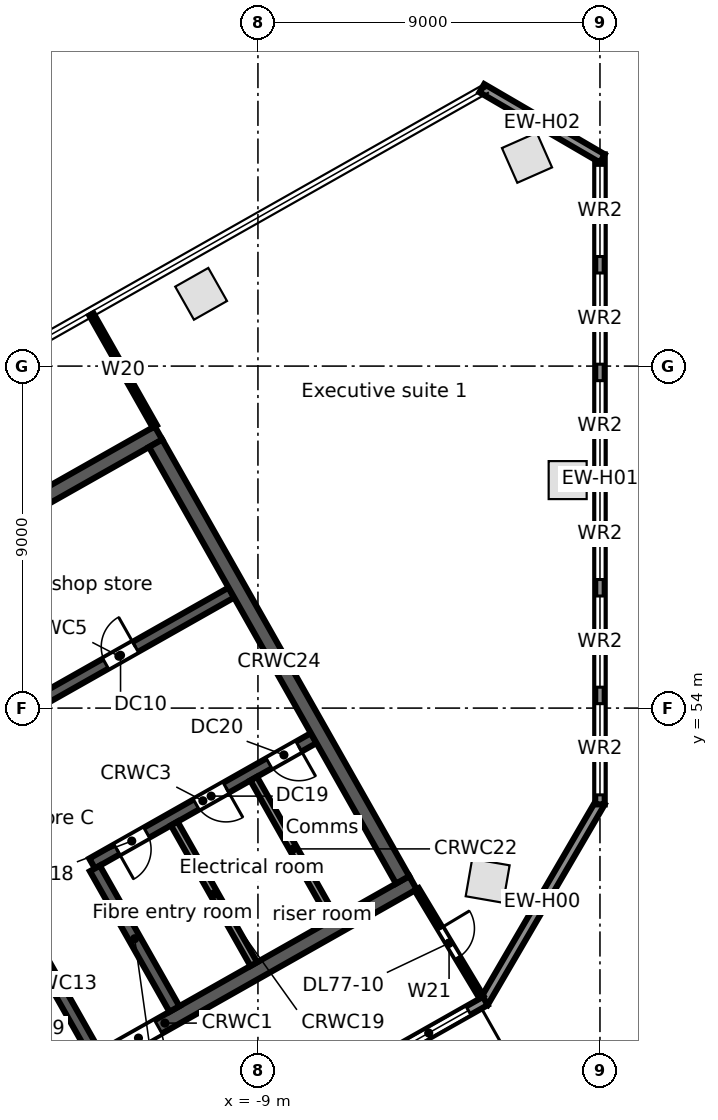
"""IFC4 building model, lengths in metres.
Left out: names, types, materials, properties, quantities, classifications, styles, units other than length and angle.
Written with IfcOpenShell. Run it as: python <this file> out.ifc"""

import sys

from ifc_helpers import new_model, si_unit, direction, frame, frame_2d, origin, origin_2d, place, context, subcontext, project, spatial, rectangle, extrude, element, fill, save


model = new_model("IFC4")
c1 = context("Model", 3, precision=1e-05, world=origin(), true_north=direction((0.0, 1.0)))
c2 = subcontext(c1, "Body", "Model", "MODEL_VIEW")
j1 = project(units=[si_unit("LENGTHUNIT", "METRE"), si_unit("PLANEANGLEUNIT", "RADIAN")], contexts=[c1])
p1 = place(None, origin())
s1 = spatial("IfcSite", under=j1, at=p1, CompositionType="ELEMENT")
p2 = place(p1, origin())
s2 = spatial("IfcBuilding", under=s1, at=p2, CompositionType="ELEMENT")
p3 = place(p2, frame((0.0, 0.0, 343.1)))
s3 = spatial("IfcBuildingStorey", under=s2, at=p3, CompositionType="ELEMENT", Elevation=343.1)
for number, where, z_axis, x_axis in (
    (1, (-10.495, 64.902, 0.0), (0.0, 0.0, 1.0), (-0.87, -0.492, 0.0)),
    (2, (-2.955, 49.456, 0.0), (0.0, 0.0, 1.0), (-0.985, 0.171, 0.0)),
    (3, (-0.85, 60.0, 0.0), (0.0, 0.0, 1.0), (0.0, 1.0, 0.0)),
    (4, (-1.92, 68.483, 0.0), (0.0, 0.0, 1.0), (-0.915, -0.404, 0.0)),
):
    element("IfcColumn", number, at=place(p3, frame(where, z_axis=z_axis, x_axis=x_axis)), inside=s3, PredefinedType="COLUMN", context=c2, shape_type="SweptSolid", body=[
        extrude(rectangle(XDim=1.0, YDim=1.0, at=origin_2d()), origin(), (0.0, 0.0, 1.0), 3.5),
    ])
p4 = place(p3, frame((0.017, 51.529, 0.0), z_axis=(0.0, 0.0, 1.0), x_axis=(-0.503769237131, -0.863838269424, 0.0)))
e5 = element("IfcWall", 5, at=p4, inside=s3, PredefinedType="STANDARD", context=c2, shape_type="SweptSolid", body=[
    extrude(rectangle(XDim=6.115, YDim=0.25, at=frame_2d((3.057, 0.0))), origin(), (0.0, 0.0, 1.0), 3.5),
])
p5 = place(p3, frame((0.0, 68.572, 0.0), z_axis=(0.0, 0.0, 1.0), x_axis=(0.0, -1.0, 0.0)))
e6 = element("IfcWall", 6, at=p5, inside=s3, PredefinedType="STANDARD", context=c2, shape_type="SweptSolid", body=[
    extrude(rectangle(XDim=17.105, YDim=0.25, at=frame_2d((8.553, 0.0))), origin(), (0.0, 0.0, 1.0), 3.5),
])
p6 = place(p5, frame((14.455, 0.0, 0.8)))
e7 = element("IfcOpeningElement", 7, at=p6, cuts=e6, PredefinedType="OPENING", context=c2, shape_type="SweptSolid", body=[
    extrude(rectangle(XDim=2.4, YDim=2.2, at=frame_2d((1.2, 1.1))), frame((0.0, 0.135, 0.0), z_axis=(0.0, -1.0, 0.0), x_axis=(1.0, 0.0, 0.0)), (0.0, 0.0, 1.0), 0.27),
])
p7 = place(p5, frame((11.622, 0.0, 0.8)))
e8 = element("IfcOpeningElement", 8, at=p7, cuts=e6, PredefinedType="OPENING", context=c2, shape_type="SweptSolid", body=[
    extrude(rectangle(XDim=2.4, YDim=2.2, at=frame_2d((1.2, 1.1))), frame((0.0, 0.135, 0.0), z_axis=(0.0, -1.0, 0.0), x_axis=(1.0, 0.0, 0.0)), (0.0, 0.0, 1.0), 0.27),
])
p8 = place(p5, frame((8.789, 0.0, 0.8)))
e9 = element("IfcOpeningElement", 9, at=p8, cuts=e6, PredefinedType="OPENING", context=c2, shape_type="SweptSolid", body=[
    extrude(rectangle(XDim=2.4, YDim=2.2, at=frame_2d((1.2, 1.1))), frame((0.0, 0.135, 0.0), z_axis=(0.0, -1.0, 0.0), x_axis=(1.0, 0.0, 0.0)), (0.0, 0.0, 1.0), 0.27),
])
p9 = place(p5, frame((5.955, 0.0, 0.8)))
e10 = element("IfcOpeningElement", 10, at=p9, cuts=e6, PredefinedType="OPENING", context=c2, shape_type="SweptSolid", body=[
    extrude(rectangle(XDim=2.4, YDim=2.2, at=frame_2d((1.2, 1.1))), frame((0.0, 0.135, 0.0), z_axis=(0.0, -1.0, 0.0), x_axis=(1.0, 0.0, 0.0)), (0.0, 0.0, 1.0), 0.27),
])
p10 = place(p5, frame((3.122, 0.0, 0.8)))
e11 = element("IfcOpeningElement", 11, at=p10, cuts=e6, PredefinedType="OPENING", context=c2, shape_type="SweptSolid", body=[
    extrude(rectangle(XDim=2.4, YDim=2.2, at=frame_2d((1.2, 1.1))), frame((0.0, 0.135, 0.0), z_axis=(0.0, -1.0, 0.0), x_axis=(1.0, 0.0, 0.0)), (0.0, 0.0, 1.0), 0.27),
])
p11 = place(p5, frame((0.289, 0.0, 0.8)))
e12 = element("IfcOpeningElement", 12, at=p11, cuts=e6, PredefinedType="OPENING", context=c2, shape_type="SweptSolid", body=[
    extrude(rectangle(XDim=2.4, YDim=2.2, at=frame_2d((1.2, 1.1))), frame((0.0, 0.135, 0.0), z_axis=(0.0, -1.0, 0.0), x_axis=(1.0, 0.0, 0.0)), (0.0, 0.0, 1.0), 0.27),
])
p12 = place(p3, frame((-3.108, 70.313, 0.0), z_axis=(0.0, 0.0, 1.0), x_axis=(0.86382474085, -0.503792434536, 0.0)))
e13 = element("IfcWall", 13, at=p12, inside=s3, PredefinedType="STANDARD", context=c2, shape_type="SweptSolid", body=[
    extrude(rectangle(XDim=3.67, YDim=0.25, at=frame_2d((1.835, 0.0))), origin(), (0.0, 0.0, 1.0), 3.5),
])
p13 = place(p3, frame((-3.017, 46.293, 0.0), z_axis=(0.0, 0.0, 1.0), x_axis=(-0.870355474887, -0.492423950812, 0.0)))
e14 = element("IfcWall", 14, at=p13, inside=s3, PredefinedType="STANDARD", context=c2, shape_type="SweptSolid", body=[
    extrude(rectangle(XDim=40.34, YDim=0.25, at=frame_2d((20.17, 0.0))), origin(), (0.0, 0.0, 1.0), 3.5),
])
p14 = place(p13, frame((37.428, 0.0, 0.8)))
e15 = element("IfcOpeningElement", 15, at=p14, cuts=e14, PredefinedType="OPENING", context=c2, shape_type="SweptSolid", body=[
    extrude(rectangle(XDim=2.4, YDim=2.2, at=frame_2d((1.2, 1.1))), frame((0.0, 0.135, 0.0), z_axis=(0.0, -1.0, 0.0), x_axis=(1.0, 0.0, 0.0)), (0.0, 0.0, 1.0), 0.27),
])
p15 = place(p13, frame((34.372, 0.0, 0.0)))
e16 = element("IfcOpeningElement", 16, at=p15, cuts=e14, PredefinedType="OPENING", context=c2, shape_type="SweptSolid", body=[
    extrude(rectangle(XDim=1.8, YDim=2.4, at=frame_2d((0.9, 1.2))), frame((0.0, 0.135, 0.0), z_axis=(0.0, -1.0, 0.0), x_axis=(1.0, 0.0, 0.0)), (0.0, 0.0, 1.0), 0.27),
])
p16 = place(p13, frame((30.716, 0.0, 0.8)))
e17 = element("IfcOpeningElement", 17, at=p16, cuts=e14, PredefinedType="OPENING", context=c2, shape_type="SweptSolid", body=[
    extrude(rectangle(XDim=2.4, YDim=2.2, at=frame_2d((1.2, 1.1))), frame((0.0, 0.135, 0.0), z_axis=(0.0, -1.0, 0.0), x_axis=(1.0, 0.0, 0.0)), (0.0, 0.0, 1.0), 0.27),
])
p17 = place(p13, frame((27.36, 0.0, 0.8)))
e18 = element("IfcOpeningElement", 18, at=p17, cuts=e14, PredefinedType="OPENING", context=c2, shape_type="SweptSolid", body=[
    extrude(rectangle(XDim=2.4, YDim=2.2, at=frame_2d((1.2, 1.1))), frame((0.0, 0.135, 0.0), z_axis=(0.0, -1.0, 0.0), x_axis=(1.0, 0.0, 0.0)), (0.0, 0.0, 1.0), 0.27),
])
p18 = place(p13, frame((24.304, 0.0, 0.0)))
e19 = element("IfcOpeningElement", 19, at=p18, cuts=e14, PredefinedType="OPENING", context=c2, shape_type="SweptSolid", body=[
    extrude(rectangle(XDim=1.8, YDim=2.4, at=frame_2d((0.9, 1.2))), frame((0.0, 0.135, 0.0), z_axis=(0.0, -1.0, 0.0), x_axis=(1.0, 0.0, 0.0)), (0.0, 0.0, 1.0), 0.27),
])
p19 = place(p13, frame((20.648, 0.0, 0.8)))
e20 = element("IfcOpeningElement", 20, at=p19, cuts=e14, PredefinedType="OPENING", context=c2, shape_type="SweptSolid", body=[
    extrude(rectangle(XDim=2.4, YDim=2.2, at=frame_2d((1.2, 1.1))), frame((0.0, 0.135, 0.0), z_axis=(0.0, -1.0, 0.0), x_axis=(1.0, 0.0, 0.0)), (0.0, 0.0, 1.0), 0.27),
])
p20 = place(p13, frame((17.292, 0.0, 0.8)))
e21 = element("IfcOpeningElement", 21, at=p20, cuts=e14, PredefinedType="OPENING", context=c2, shape_type="SweptSolid", body=[
    extrude(rectangle(XDim=2.4, YDim=2.2, at=frame_2d((1.2, 1.1))), frame((0.0, 0.135, 0.0), z_axis=(0.0, -1.0, 0.0), x_axis=(1.0, 0.0, 0.0)), (0.0, 0.0, 1.0), 0.27),
])
p21 = place(p13, frame((14.236, 0.0, 0.0)))
e22 = element("IfcOpeningElement", 22, at=p21, cuts=e14, PredefinedType="OPENING", context=c2, shape_type="SweptSolid", body=[
    extrude(rectangle(XDim=1.8, YDim=2.4, at=frame_2d((0.9, 1.2))), frame((0.0, 0.135, 0.0), z_axis=(0.0, -1.0, 0.0), x_axis=(1.0, 0.0, 0.0)), (0.0, 0.0, 1.0), 0.27),
])
p22 = place(p13, frame((10.58, 0.0, 0.8)))
e23 = element("IfcOpeningElement", 23, at=p22, cuts=e14, PredefinedType="OPENING", context=c2, shape_type="SweptSolid", body=[
    extrude(rectangle(XDim=2.4, YDim=2.2, at=frame_2d((1.2, 1.1))), frame((0.0, 0.135, 0.0), z_axis=(0.0, -1.0, 0.0), x_axis=(1.0, 0.0, 0.0)), (0.0, 0.0, 1.0), 0.27),
])
p23 = place(p13, frame((7.224, 0.0, 0.8)))
e24 = element("IfcOpeningElement", 24, at=p23, cuts=e14, PredefinedType="OPENING", context=c2, shape_type="SweptSolid", body=[
    extrude(rectangle(XDim=2.4, YDim=2.2, at=frame_2d((1.2, 1.1))), frame((0.0, 0.135, 0.0), z_axis=(0.0, -1.0, 0.0), x_axis=(1.0, 0.0, 0.0)), (0.0, 0.0, 1.0), 0.27),
])
p24 = place(p13, frame((4.168, 0.0, 0.0)))
e25 = element("IfcOpeningElement", 25, at=p24, cuts=e14, PredefinedType="OPENING", context=c2, shape_type="SweptSolid", body=[
    extrude(rectangle(XDim=1.8, YDim=2.4, at=frame_2d((0.9, 1.2))), frame((0.0, 0.135, 0.0), z_axis=(0.0, -1.0, 0.0), x_axis=(1.0, 0.0, 0.0)), (0.0, 0.0, 1.0), 0.27),
])
p25 = place(p13, frame((0.512, 0.0, 0.8)))
e26 = element("IfcOpeningElement", 26, at=p25, cuts=e14, PredefinedType="OPENING", context=c2, shape_type="SweptSolid", body=[
    extrude(rectangle(XDim=2.4, YDim=2.2, at=frame_2d((1.2, 1.1))), frame((0.0, 0.135, 0.0), z_axis=(0.0, -1.0, 0.0), x_axis=(1.0, 0.0, 0.0)), (0.0, 0.0, 1.0), 0.27),
])
p26 = place(p3, frame((-17.975, 42.017, 0.0), z_axis=(0.0, 0.0, 1.0), x_axis=(0.87034965173, 0.492434243055, 0.0)))
e27 = element("IfcWall", 27, at=p26, inside=s3, PredefinedType="SOLIDWALL", context=c2, shape_type="SweptSolid", body=[
    extrude(rectangle(XDim=15.0, YDim=0.4, at=frame_2d((7.5, 0.0))), origin(), (0.0, 0.0, 1.0), 3.5),
])
p27 = place(p26, frame((6.1, 0.0, 0.0)))
e28 = element("IfcOpeningElement", 28, at=p27, cuts=e27, PredefinedType="OPENING", context=c2, shape_type="SweptSolid", body=[
    extrude(rectangle(XDim=1.2, YDim=2.1, at=frame_2d((0.6, 1.05))), frame((0.0, 0.21, 0.0), z_axis=(0.0, -1.0, 0.0), x_axis=(1.0, 0.0, 0.0)), (0.0, 0.0, 1.0), 0.42),
])
p28 = place(p3, frame((-13.365, 49.911, 0.0), z_axis=(0.0, 0.0, 1.0), x_axis=(0.870347618718, 0.492437836272, 0.0)))
e29 = element("IfcWall", 29, at=p28, inside=s3, PredefinedType="SOLIDWALL", context=c2, shape_type="SweptSolid", body=[
    extrude(rectangle(XDim=6.7, YDim=0.3, at=frame_2d((3.35, 0.0))), origin(), (0.0, 0.0, 1.0), 3.5),
])
p29 = place(p28, frame((0.75, 0.0, 0.0)))
e30 = element("IfcOpeningElement", 30, at=p29, cuts=e29, PredefinedType="OPENING", context=c2, shape_type="SweptSolid", body=[
    extrude(rectangle(XDim=0.9, YDim=2.1, at=frame_2d((0.45, 1.05))), frame((0.0, 0.16, 0.0), z_axis=(0.0, -1.0, 0.0), x_axis=(1.0, 0.0, 0.0)), (0.0, 0.0, 1.0), 0.32),
])
p30 = place(p28, frame((3.15, 0.0, 0.0)))
e31 = element("IfcOpeningElement", 31, at=p30, cuts=e29, PredefinedType="OPENING", context=c2, shape_type="SweptSolid", body=[
    extrude(rectangle(XDim=0.9, YDim=2.1, at=frame_2d((0.45, 1.05))), frame((0.0, 0.16, 0.0), z_axis=(0.0, -1.0, 0.0), x_axis=(1.0, 0.0, 0.0)), (0.0, 0.0, 1.0), 0.32),
])
p31 = place(p28, frame((5.35, 0.0, 0.0)))
e32 = element("IfcOpeningElement", 32, at=p31, cuts=e29, PredefinedType="OPENING", context=c2, shape_type="SweptSolid", body=[
    extrude(rectangle(XDim=0.9, YDim=2.1, at=frame_2d((0.45, 1.05))), frame((0.0, 0.16, 0.0), z_axis=(0.0, -1.0, 0.0), x_axis=(1.0, 0.0, 0.0)), (0.0, 0.0, 1.0), 0.32),
])
p32 = place(p3, frame((-15.618, 53.691, 0.0), z_axis=(0.0, 0.0, 1.0), x_axis=(0.870362830851, 0.492410948978, 0.0)))
e33 = element("IfcWall", 33, at=p32, inside=s3, PredefinedType="SOLIDWALL", context=c2, shape_type="SweptSolid", body=[
    extrude(rectangle(XDim=6.8, YDim=0.3, at=frame_2d((3.4, 0.0))), origin(), (0.0, 0.0, 1.0), 3.5),
])
p33 = place(p32, frame((3.0, 0.0, 0.0)))
e34 = element("IfcOpeningElement", 34, at=p33, cuts=e33, PredefinedType="OPENING", context=c2, shape_type="SweptSolid", body=[
    extrude(rectangle(XDim=0.9, YDim=2.1, at=frame_2d((0.45, 1.05))), frame((0.0, 0.16, 0.0), z_axis=(0.0, -1.0, 0.0), x_axis=(1.0, 0.0, 0.0)), (0.0, 0.0, 1.0), 0.32),
])
p34 = place(p3, frame((-24.672, 53.854, 0.0), z_axis=(0.0, 0.0, 1.0), x_axis=(0.870353598469, 0.492427267353, 0.0)))
e35 = element("IfcWall", 35, at=p34, inside=s3, PredefinedType="SOLIDWALL", context=c2, shape_type="SweptSolid", body=[
    extrude(rectangle(XDim=15.0, YDim=0.4, at=frame_2d((7.5, 0.0))), origin(), (0.0, 0.0, 1.0), 3.5),
])
p35 = place(p3, frame((-15.379, 48.599, 0.0), z_axis=(0.0, 0.0, 1.0), x_axis=(0.492422543467, -0.870356271124, 0.0)))
e36 = element("IfcWall", 36, at=p35, inside=s3, PredefinedType="SOLIDWALL", context=c2, shape_type="SweptSolid", body=[
    extrude(rectangle(XDim=4.25, YDim=0.3, at=frame_2d((2.125, 0.0))), origin(), (0.0, 0.0, 1.0), 3.5),
])
p36 = place(p3, frame((-13.291, 49.781, 0.0), z_axis=(0.0, 0.0, 1.0), x_axis=(0.492397924348, -0.870370199454, 0.0)))
e37 = element("IfcWall", 37, at=p36, inside=s3, PredefinedType="SOLIDWALL", context=c2, shape_type="SweptSolid", body=[
    extrude(rectangle(XDim=4.25, YDim=0.3, at=frame_2d((2.125, 0.0))), origin(), (0.0, 0.0, 1.0), 3.5),
])
p37 = place(p3, frame((-11.202, 50.962, 0.0), z_axis=(0.0, 0.0, 1.0), x_axis=(0.492441437811, -0.870345580977, 0.0)))
e38 = element("IfcWall", 38, at=p37, inside=s3, PredefinedType="PARTITIONING", context=c2, shape_type="SweptSolid", body=[
    extrude(rectangle(XDim=4.25, YDim=0.2, at=frame_2d((2.125, 0.0))), origin(), (0.0, 0.0, 1.0), 3.5),
])
p38 = place(p3, frame((-9.113, 52.144, 0.0), z_axis=(0.0, 0.0, 1.0), x_axis=(0.492422543467, -0.870356271124, 0.0)))
e39 = element("IfcWall", 39, at=p38, inside=s3, PredefinedType="PARTITIONING", context=c2, shape_type="SweptSolid", body=[
    extrude(rectangle(XDim=4.25, YDim=0.2, at=frame_2d((2.125, 0.0))), origin(), (0.0, 0.0, 1.0), 3.5),
])
p39 = place(p3, frame((-11.692, 60.968, 0.0), z_axis=(0.0, 0.0, 1.0), x_axis=(0.492421663121, -0.870356769198, 0.0)))
e40 = element("IfcWall", 40, at=p39, inside=s3, PredefinedType="SOLIDWALL", context=c2, shape_type="SweptSolid", body=[
    extrude(rectangle(XDim=13.2, YDim=0.4, at=frame_2d((6.6, 0.0))), origin(), (0.0, 0.0, 1.0), 3.5),
])
p40 = place(p3, frame((-13.382, 64.36, 0.0), z_axis=(0.0, 0.0, 1.0), x_axis=(0.492468354667, -0.870330350874, 0.0)))
e41 = element("IfcWall", 41, at=p40, inside=s3, PredefinedType="PARTITIONING", context=c2, shape_type="SweptSolid", body=[
    extrude(rectangle(XDim=3.385, YDim=0.125, at=frame_2d((1.692, 0.0))), origin(), (0.0, 0.0, 1.0), 2.38),
])
p41 = place(p3, frame((-4.821, 49.23, 0.0), z_axis=(0.0, 0.0, 1.0), x_axis=(0.515006587647, -0.857186219371, 0.0)))
e42 = element("IfcWall", 42, at=p41, inside=s3, PredefinedType="PARTITIONING", context=c2, shape_type="SweptSolid", body=[
    extrude(rectangle(XDim=3.303, YDim=0.125, at=frame_2d((1.651, 0.0))), origin(), (0.0, 0.0, 1.0), 2.88),
])
p42 = place(p41, frame((1.2, 0.0, 0.0)))
e43 = element("IfcOpeningElement", 43, at=p42, cuts=e42, PredefinedType="OPENING", context=c2, shape_type="SweptSolid", body=[
    extrude(rectangle(XDim=0.9, YDim=2.1, at=frame_2d((0.45, 1.05))), frame((0.0, 0.073, 0.0), z_axis=(0.0, -1.0, 0.0), x_axis=(1.0, 0.0, 0.0)), (0.0, 0.0, 1.0), 0.145),
])
p43 = place(p6, origin())
e44 = element("IfcWindow", 44, at=p43, inside=s3, PartitioningType="SINGLE_PANEL", PredefinedType="WINDOW", context=c2, shape_type="SweptSolid", body=[
    extrude(rectangle(XDim=2.4, YDim=2.2, at=frame_2d((1.2, 1.1))), frame((0.0, 0.03, 0.0), z_axis=(0.0, -1.0, 0.0), x_axis=(1.0, 0.0, 0.0)), (0.0, 0.0, 1.0), 0.06),
])
fill(e7, e44)
p44 = place(p7, origin())
e45 = element("IfcWindow", 45, at=p44, inside=s3, PartitioningType="SINGLE_PANEL", PredefinedType="WINDOW", context=c2, shape_type="SweptSolid", body=[
    extrude(rectangle(XDim=2.4, YDim=2.2, at=frame_2d((1.2, 1.1))), frame((0.0, 0.03, 0.0), z_axis=(0.0, -1.0, 0.0), x_axis=(1.0, 0.0, 0.0)), (0.0, 0.0, 1.0), 0.06),
])
fill(e8, e45)
p45 = place(p8, origin())
e46 = element("IfcWindow", 46, at=p45, inside=s3, PartitioningType="SINGLE_PANEL", PredefinedType="WINDOW", context=c2, shape_type="SweptSolid", body=[
    extrude(rectangle(XDim=2.4, YDim=2.2, at=frame_2d((1.2, 1.1))), frame((0.0, 0.03, 0.0), z_axis=(0.0, -1.0, 0.0), x_axis=(1.0, 0.0, 0.0)), (0.0, 0.0, 1.0), 0.06),
])
fill(e9, e46)
p46 = place(p9, origin())
e47 = element("IfcWindow", 47, at=p46, inside=s3, PartitioningType="SINGLE_PANEL", PredefinedType="WINDOW", context=c2, shape_type="SweptSolid", body=[
    extrude(rectangle(XDim=2.4, YDim=2.2, at=frame_2d((1.2, 1.1))), frame((0.0, 0.03, 0.0), z_axis=(0.0, -1.0, 0.0), x_axis=(1.0, 0.0, 0.0)), (0.0, 0.0, 1.0), 0.06),
])
fill(e10, e47)
p47 = place(p10, origin())
e48 = element("IfcWindow", 48, at=p47, inside=s3, PartitioningType="SINGLE_PANEL", PredefinedType="WINDOW", context=c2, shape_type="SweptSolid", body=[
    extrude(rectangle(XDim=2.4, YDim=2.2, at=frame_2d((1.2, 1.1))), frame((0.0, 0.03, 0.0), z_axis=(0.0, -1.0, 0.0), x_axis=(1.0, 0.0, 0.0)), (0.0, 0.0, 1.0), 0.06),
])
fill(e11, e48)
p48 = place(p11, origin())
e49 = element("IfcWindow", 49, at=p48, inside=s3, PartitioningType="SINGLE_PANEL", PredefinedType="WINDOW", context=c2, shape_type="SweptSolid", body=[
    extrude(rectangle(XDim=2.4, YDim=2.2, at=frame_2d((1.2, 1.1))), frame((0.0, 0.03, 0.0), z_axis=(0.0, -1.0, 0.0), x_axis=(1.0, 0.0, 0.0)), (0.0, 0.0, 1.0), 0.06),
])
fill(e12, e49)
p49 = place(p25, origin())
e50 = element("IfcWindow", 50, at=p49, inside=s3, PartitioningType="SINGLE_PANEL", PredefinedType="WINDOW", context=c2, shape_type="SweptSolid", body=[
    extrude(rectangle(XDim=2.4, YDim=2.2, at=frame_2d((1.2, 1.1))), frame((0.0, 0.03, 0.0), z_axis=(0.0, -1.0, 0.0), x_axis=(1.0, 0.0, 0.0)), (0.0, 0.0, 1.0), 0.06),
])
fill(e26, e50)
p50 = place(p27, frame((1.2, 0.0, 0.0), z_axis=(0.0, 0.0, 1.0), x_axis=(-1.0, 0.0, 0.0)))
e51 = element("IfcDoor", 51, at=p50, inside=s3, OperationType="SINGLE_SWING_RIGHT", PredefinedType="DOOR", context=c2, shape_type="SweptSolid", body=[
    extrude(rectangle(XDim=1.2, YDim=2.1, at=frame_2d((0.6, 1.05))), frame((0.0, 0.025, 0.0), z_axis=(0.0, -1.0, 0.0), x_axis=(1.0, 0.0, 0.0)), (0.0, 0.0, 1.0), 0.05),
])
fill(e28, e51)
p51 = place(p33, origin())
e52 = element("IfcDoor", 52, at=p51, inside=s3, OperationType="SINGLE_SWING_RIGHT", PredefinedType="DOOR", context=c2, shape_type="SweptSolid", body=[
    extrude(rectangle(XDim=0.9, YDim=2.1, at=frame_2d((0.45, 1.05))), frame((0.0, 0.025, 0.0), z_axis=(0.0, -1.0, 0.0), x_axis=(1.0, 0.0, 0.0)), (0.0, 0.0, 1.0), 0.05),
])
fill(e34, e52)
p52 = place(p29, frame((0.9, 0.0, 0.0), z_axis=(0.0, 0.0, 1.0), x_axis=(-1.0, 0.0, 0.0)))
e53 = element("IfcDoor", 53, at=p52, inside=s3, OperationType="SINGLE_SWING_RIGHT", PredefinedType="DOOR", context=c2, shape_type="SweptSolid", body=[
    extrude(rectangle(XDim=0.9, YDim=2.1, at=frame_2d((0.45, 1.05))), frame((0.0, 0.025, 0.0), z_axis=(0.0, -1.0, 0.0), x_axis=(1.0, 0.0, 0.0)), (0.0, 0.0, 1.0), 0.05),
])
fill(e30, e53)
p53 = place(p30, frame((0.9, 0.0, 0.0), z_axis=(0.0, 0.0, 1.0), x_axis=(-1.0, 0.0, 0.0)))
e54 = element("IfcDoor", 54, at=p53, inside=s3, OperationType="SINGLE_SWING_LEFT", PredefinedType="DOOR", context=c2, shape_type="SweptSolid", body=[
    extrude(rectangle(XDim=0.9, YDim=2.1, at=frame_2d((0.45, 1.05))), frame((0.0, 0.025, 0.0), z_axis=(0.0, -1.0, 0.0), x_axis=(1.0, 0.0, 0.0)), (0.0, 0.0, 1.0), 0.05),
])
fill(e31, e54)
p54 = place(p31, frame((0.9, 0.0, 0.0), z_axis=(0.0, 0.0, 1.0), x_axis=(-1.0, 0.0, 0.0)))
e55 = element("IfcDoor", 55, at=p54, inside=s3, OperationType="SINGLE_SWING_LEFT", PredefinedType="DOOR", context=c2, shape_type="SweptSolid", body=[
    extrude(rectangle(XDim=0.9, YDim=2.1, at=frame_2d((0.45, 1.05))), frame((0.0, 0.025, 0.0), z_axis=(0.0, -1.0, 0.0), x_axis=(1.0, 0.0, 0.0)), (0.0, 0.0, 1.0), 0.05),
])
fill(e32, e55)
p55 = place(p42, origin())
e56 = element("IfcDoor", 56, at=p55, inside=s3, OperationType="SINGLE_SWING_LEFT", PredefinedType="DOOR", context=c2, shape_type="SweptSolid", body=[
    extrude(rectangle(XDim=0.9, YDim=2.1, at=frame_2d((0.45, 1.05))), frame((0.0, 0.025, 0.0), z_axis=(0.0, -1.0, 0.0), x_axis=(1.0, 0.0, 0.0)), (0.0, 0.0, 1.0), 0.05),
])
fill(e43, e56)
save(model, sys.argv[1])
